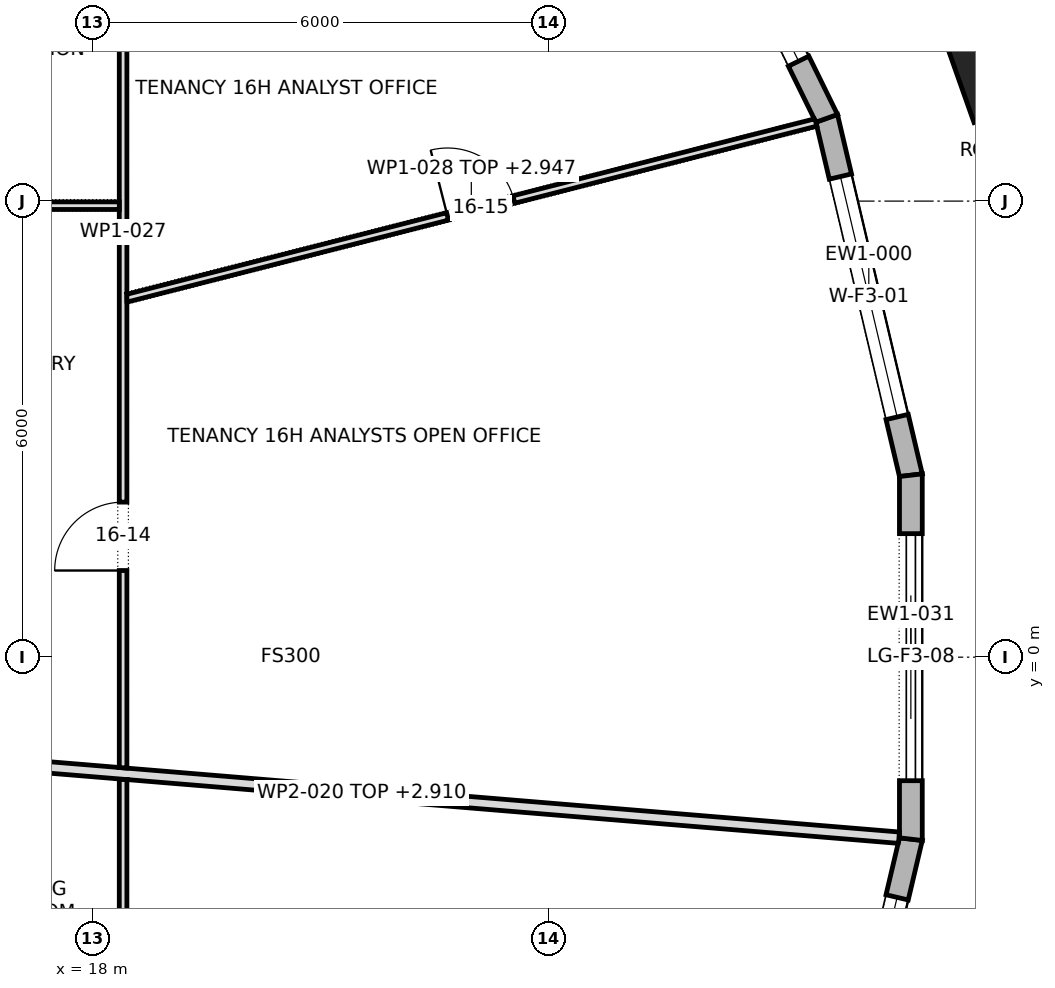
"""IFC4 building model, lengths in metres.
Left out: names, types, materials, properties, quantities, classifications, styles, units other than length and angle.
Written with IfcOpenShell. Run it as: python <this file> out.ifc"""

import sys

from ifc_helpers import new_model, si_unit, direction, frame, frame_2d, origin, origin_2d, place, context, subcontext, project, spatial, polyline, rectangle, outline, extrude, element, fill, save


model = new_model("IFC4")
c1 = context("Model", 3, precision=1e-05, world=origin(), true_north=direction((0.0, 1.0)))
c2 = subcontext(c1, "Body", "Model", "MODEL_VIEW")
j1 = project(units=[si_unit("LENGTHUNIT", "METRE"), si_unit("PLANEANGLEUNIT", "RADIAN")], contexts=[c1])
p1 = place(None, origin())
s1 = spatial("IfcSite", under=j1, at=p1, CompositionType="ELEMENT")
p2 = place(p1, origin())
s2 = spatial("IfcBuilding", under=s1, at=p2, CompositionType="ELEMENT")
p3 = place(p2, frame((0.0, 0.0, 234.9)))
s3 = spatial("IfcBuildingStorey", under=s2, at=p3, CompositionType="ELEMENT", Elevation=234.9)
p4 = place(p3, frame((29.867, 7.766, 0.0), z_axis=(0.0, 0.0, 1.0), x_axis=(-0.333624233576, 0.942706142321, 0.0)))
e1 = element("IfcColumn", 1, at=p4, inside=s3, PredefinedType="COLUMN", context=c2, shape_type="SweptSolid", body=[
    extrude(rectangle(XDim=1.2, YDim=1.0, at=origin_2d()), origin(), (0.0, 0.0, 1.0), 4.0),
])
p5 = place(p3, frame((28.764, 2.394, 0.0), z_axis=(0.0, 0.0, 1.0), x_axis=(-0.229617574796, 0.97328093033, 0.0)))
e2 = element("IfcWall", 2, at=p5, inside=s3, PredefinedType="STANDARD", context=c2, shape_type="SweptSolid", body=[
    extrude(outline(polyline([(-0.017, -0.15), (4.841, -0.15), (4.807, 0.15), (0.017, 0.15), (-0.017, -0.15)])), origin(), (0.0, 0.0, 1.0), 3.7),
])
p6 = place(p5, frame((0.787, 0.0, 0.6)))
e3 = element("IfcOpeningElement", 3, at=p6, cuts=e2, PredefinedType="OPENING", context=c2, shape_type="SweptSolid", body=[
    extrude(rectangle(XDim=3.25, YDim=2.65, at=frame_2d((1.625, 1.325))), frame((0.0, 0.162, 0.0), z_axis=(0.0, -1.0, 0.0), x_axis=(1.0, 0.0, 0.0)), (0.0, 0.0, 1.0), 0.324),
])
p7 = place(p3, frame((27.656, 7.089, 0.0), z_axis=(0.0, 0.0, 1.0), x_axis=(-0.440857641837, 0.897577038272, 0.0)))
e4 = element("IfcWall", 4, at=p7, inside=s3, PredefinedType="STANDARD", context=c2, shape_type="SweptSolid", body=[
    extrude(outline(polyline([(-0.017, -0.15), (4.941, -0.15), (4.909, 0.15), (0.017, 0.15), (-0.017, -0.15)])), origin(), (0.0, 0.0, 1.0), 3.7),
])
p8 = place(p7, frame((0.838, 0.0, 0.6)))
e5 = element("IfcOpeningElement", 5, at=p8, cuts=e4, PredefinedType="OPENING", context=c2, shape_type="SweptSolid", body=[
    extrude(rectangle(XDim=3.25, YDim=2.65, at=frame_2d((1.625, 1.325))), frame((0.0, 0.162, 0.0), z_axis=(0.0, -1.0, 0.0), x_axis=(1.0, 0.0, 0.0)), (0.0, 0.0, 1.0), 0.324),
])
p9 = place(p3, frame((27.656, -7.089, 0.0), z_axis=(0.0, 0.0, 1.0), x_axis=(0.229617574796, 0.97328093033, 0.0)))
e6 = element("IfcWall", 6, at=p9, inside=s3, PredefinedType="STANDARD", context=c2, shape_type="SweptSolid", body=[
    extrude(outline(polyline([(-0.017, -0.15), (4.841, -0.15), (4.807, 0.15), (0.017, 0.15), (-0.017, -0.15)])), origin(), (0.0, 0.0, 1.0), 3.7),
])
p10 = place(p9, frame((0.787, 0.0, 0.6)))
e7 = element("IfcOpeningElement", 7, at=p10, cuts=e6, PredefinedType="OPENING", context=c2, shape_type="SweptSolid", body=[
    extrude(rectangle(XDim=3.25, YDim=2.65, at=frame_2d((1.625, 1.325))), frame((0.0, 0.162, 0.0), z_axis=(0.0, -1.0, 0.0), x_axis=(1.0, 0.0, 0.0)), (0.0, 0.0, 1.0), 0.324),
])
p11 = place(p3, frame((28.764, -2.394, 0.0), z_axis=(0.0, 0.0, 1.0), x_axis=(0.0, 1.0, 0.0)))
e8 = element("IfcWall", 8, at=p11, inside=s3, PredefinedType="STANDARD", context=c2, shape_type="SweptSolid", body=[
    extrude(outline(polyline([(-0.017, -0.15), (4.805, -0.15), (4.77, 0.15), (0.017, 0.15), (-0.017, -0.15)])), origin(), (0.0, 0.0, 1.0), 3.7),
])
p12 = place(p11, frame((0.769, 0.0, 0.0)))
e9 = element("IfcOpeningElement", 9, at=p12, cuts=e8, PredefinedType="OPENING", context=c2, shape_type="SweptSolid", body=[
    extrude(rectangle(XDim=3.25, YDim=3.25, at=frame_2d((1.625, 1.625))), frame((0.0, 0.162, 0.0), z_axis=(0.0, -1.0, 0.0), x_axis=(1.0, 0.0, 0.0)), (0.0, 0.0, 1.0), 0.324),
])
p13 = place(p3, frame((14.466, -1.206, 0.0), z_axis=(0.0, 0.0, 1.0), x_axis=(0.996598124583, -0.082414671491, 0.0)))
e10 = element("IfcWall", 10, at=p13, inside=s3, PredefinedType="PARTITIONING", context=c2, shape_type="SweptSolid", body=[
    extrude(outline(polyline([(0.0, -0.075), (1.334, -0.075), (2.667, -0.075), (4.001, -0.075), (4.003, -0.075), (4.003, -0.075), (5.7, -0.075), (7.397, -0.075), (9.094, -0.075), (10.791, -0.075), (12.488, -0.075), (14.185, -0.075), (14.19, -0.044), (14.19, 0.075), (12.475, 0.075), (10.761, 0.075), (9.046, 0.075), (7.332, 0.075), (5.617, 0.075), (3.903, 0.075), (3.891, 0.074), (3.891, 0.075), (1.947, 0.075), (0.002, 0.075), (0.008, 0.006), (0.0, 0.006), (0.0, -0.075)])), origin(), (0.0, 0.0, 1.0), 2.91),
])
p14 = place(p3, frame((18.4, -12.73, 0.0), z_axis=(0.0, 0.0, 1.0), x_axis=(0.0, 1.0, 0.0)))
e11 = element("IfcWall", 11, at=p14, inside=s3, PredefinedType="PARTITIONING", context=c2, shape_type="SweptSolid", body=[
    extrude(rectangle(XDim=11.12, YDim=0.1, at=frame_2d((5.56, 0.0))), origin(), (0.0, 0.0, 1.0), 3.7),
])
p15 = place(p14, frame((3.365, 0.0, 0.0)))
e12 = element("IfcOpeningElement", 12, at=p15, cuts=e11, PredefinedType="OPENING", context=c2, shape_type="SweptSolid", body=[
    extrude(rectangle(XDim=0.9, YDim=2.1, at=frame_2d((0.45, 1.05))), frame((0.0, 0.062, 0.0), z_axis=(0.0, -1.0, 0.0), x_axis=(1.0, 0.0, 0.0)), (0.0, 0.0, 1.0), 0.124),
])
p16 = place(p3, frame((18.4, -1.459, 0.0), z_axis=(0.0, 0.0, 1.0), x_axis=(0.0, 1.0, 0.0)))
e13 = element("IfcWall", 13, at=p16, inside=s3, PredefinedType="PARTITIONING", context=c2, shape_type="SweptSolid", body=[
    extrude(outline(polyline([(0.0, -0.05), (1.557, -0.05), (3.113, -0.05), (4.67, -0.05), (6.227, -0.05), (6.233, -0.048), (6.234, -0.05), (8.027, -0.05), (9.821, -0.05), (9.826, -0.048), (9.827, -0.05), (11.268, -0.05), (12.709, -0.05), (14.151, -0.05), (14.151, -0.05), (14.145, -0.04), (14.151, -0.036), (14.151, -0.034), (14.138, -0.043), (14.073, 0.05), (12.417, 0.05), (10.761, 0.05), (9.105, 0.05), (7.449, 0.05), (7.449, 0.05), (7.349, 0.05), (7.349, 0.05), (5.514, 0.05), (3.679, 0.05), (1.844, 0.05), (0.008, 0.05), (0.0, -0.048), (0.0, -0.05)])), origin(), (0.0, 0.0, 1.0), 3.7),
])
p17 = place(p16, frame((2.6, 0.0, 0.0)))
e14 = element("IfcOpeningElement", 14, at=p17, cuts=e13, PredefinedType="OPENING", context=c2, shape_type="SweptSolid", body=[
    extrude(rectangle(XDim=0.9, YDim=2.1, at=frame_2d((0.45, 1.05))), frame((0.0, 0.062, 0.0), z_axis=(0.0, -1.0, 0.0), x_axis=(1.0, 0.0, 0.0)), (0.0, 0.0, 1.0), 0.124),
])
p18 = place(p3, frame((18.438, 4.719, 0.0), z_axis=(0.0, 0.0, 1.0), x_axis=(0.968975503795, 0.247156778269, 0.0)))
e15 = element("IfcWall", 15, at=p18, inside=s3, PredefinedType="PARTITIONING", context=c2, shape_type="SweptSolid", body=[
    extrude(outline(polyline([(9.367, -0.05), (9.367, 0.008), (9.358, 0.05), (7.492, 0.05), (5.625, 0.05), (3.759, 0.05), (1.892, 0.05), (0.025, 0.05), (0.0, -0.05), (0.0, -0.05), (1.874, -0.05), (3.747, -0.05), (5.62, -0.05), (7.494, -0.05), (9.367, -0.05)])), origin(), (0.0, 0.0, 1.0), 2.947),
])
p19 = place(p18, frame((4.367, 0.0, 0.0)))
e16 = element("IfcOpeningElement", 16, at=p19, cuts=e15, PredefinedType="OPENING", context=c2, shape_type="SweptSolid", body=[
    extrude(rectangle(XDim=0.9, YDim=2.1, at=frame_2d((0.45, 1.05))), frame((0.0, 0.062, 0.0), z_axis=(0.0, -1.0, 0.0), x_axis=(1.0, 0.0, 0.0)), (0.0, 0.0, 1.0), 0.124),
])
p20 = place(p3, frame((18.35, 5.94, 0.0), z_axis=(0.0, 0.0, 1.0), x_axis=(-1.0, 0.0, 0.0)))
e17 = element("IfcWall", 17, at=p20, inside=s3, PredefinedType="PARTITIONING", context=c2, shape_type="SweptSolid", body=[
    extrude(rectangle(XDim=3.875, YDim=0.1, at=frame_2d((1.938, 0.0))), origin(), (0.0, 0.0, 1.0), 3.7),
])
p21 = place(p6, origin())
e18 = element("IfcWindow", 18, at=p21, inside=s3, PartitioningType="TRIPLE_PANEL_VERTICAL", PredefinedType="WINDOW", context=c2, shape_type="SweptSolid", body=[
    extrude(rectangle(XDim=3.25, YDim=2.65, at=frame_2d((1.625, 1.325))), frame((0.0, 0.03, 0.0), z_axis=(0.0, -1.0, 0.0), x_axis=(1.0, 0.0, 0.0)), (0.0, 0.0, 1.0), 0.06),
])
fill(e3, e18)
p22 = place(p8, origin())
e19 = element("IfcWindow", 19, at=p22, inside=s3, PartitioningType="TRIPLE_PANEL_VERTICAL", PredefinedType="WINDOW", context=c2, shape_type="SweptSolid", body=[
    extrude(rectangle(XDim=3.25, YDim=2.65, at=frame_2d((1.625, 1.325))), frame((0.0, 0.03, 0.0), z_axis=(0.0, -1.0, 0.0), x_axis=(1.0, 0.0, 0.0)), (0.0, 0.0, 1.0), 0.06),
])
fill(e5, e19)
p23 = place(p10, origin())
e20 = element("IfcWindow", 20, at=p23, inside=s3, PartitioningType="TRIPLE_PANEL_VERTICAL", PredefinedType="WINDOW", context=c2, shape_type="SweptSolid", body=[
    extrude(rectangle(XDim=3.25, YDim=2.65, at=frame_2d((1.625, 1.325))), frame((0.0, 0.03, 0.0), z_axis=(0.0, -1.0, 0.0), x_axis=(1.0, 0.0, 0.0)), (0.0, 0.0, 1.0), 0.06),
])
fill(e7, e20)
p24 = place(p12, origin())
e21 = element("IfcDoor", 21, at=p24, inside=s3, OperationType="DOUBLE_DOOR_SLIDING", PredefinedType="DOOR", context=c2, shape_type="SweptSolid", body=[
    extrude(rectangle(XDim=3.25, YDim=3.25, at=frame_2d((1.625, 1.625))), frame((0.0, 0.025, 0.0), z_axis=(0.0, -1.0, 0.0), x_axis=(1.0, 0.0, 0.0)), (0.0, 0.0, 1.0), 0.05),
])
fill(e9, e21)
p25 = place(p17, origin())
e22 = element("IfcDoor", 22, at=p25, inside=s3, OperationType="SINGLE_SWING_RIGHT", PredefinedType="DOOR", context=c2, shape_type="SweptSolid", body=[
    extrude(rectangle(XDim=0.9, YDim=2.1, at=frame_2d((0.45, 1.05))), frame((0.0, 0.025, 0.0), z_axis=(0.0, -1.0, 0.0), x_axis=(1.0, 0.0, 0.0)), (0.0, 0.0, 1.0), 0.05),
])
fill(e14, e22)
p26 = place(p19, origin())
e23 = element("IfcDoor", 23, at=p26, inside=s3, OperationType="SINGLE_SWING_RIGHT", PredefinedType="DOOR", context=c2, shape_type="SweptSolid", body=[
    extrude(rectangle(XDim=0.9, YDim=2.1, at=frame_2d((0.45, 1.05))), frame((0.0, 0.025, 0.0), z_axis=(0.0, -1.0, 0.0), x_axis=(1.0, 0.0, 0.0)), (0.0, 0.0, 1.0), 0.05),
])
fill(e16, e23)
save(model, sys.argv[1])
